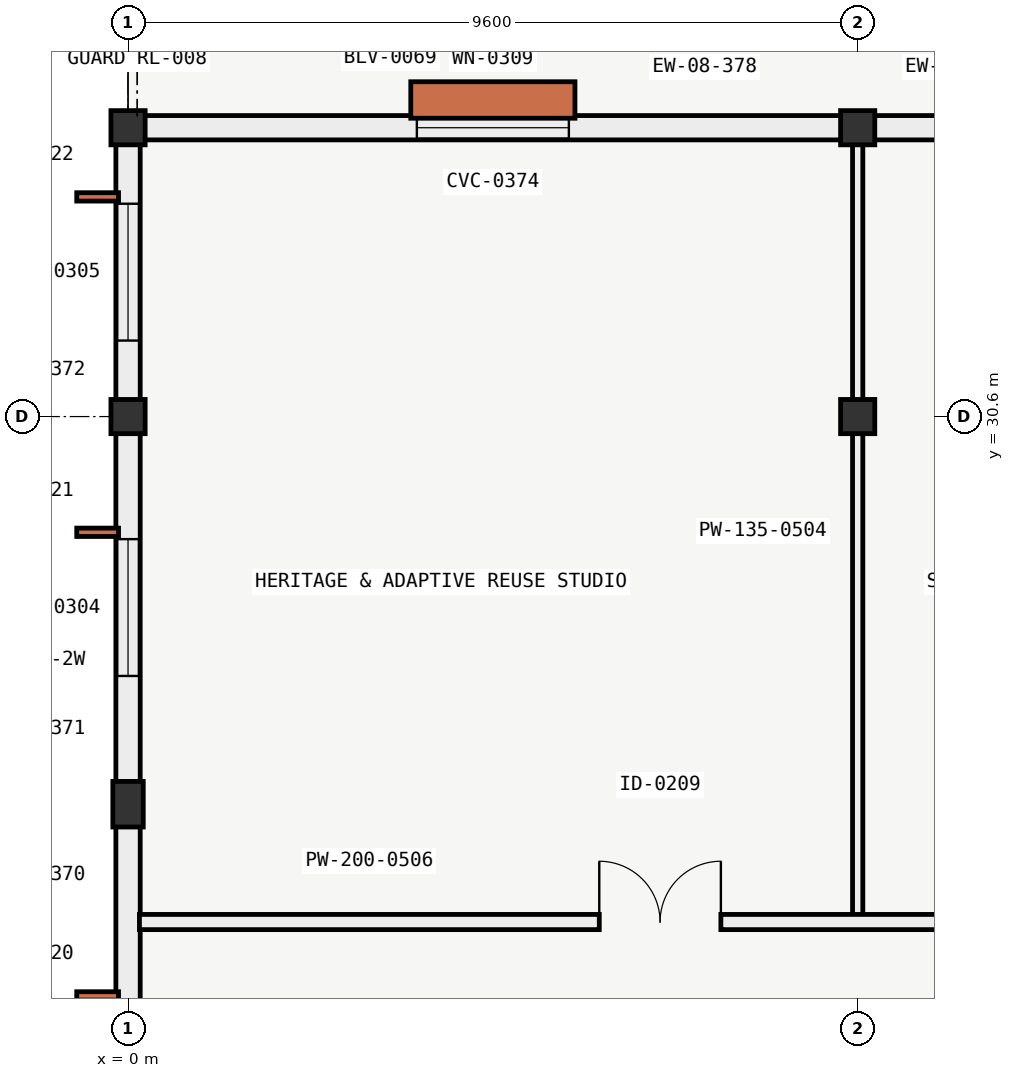
"""IFC4 building model, lengths in metres.
Left out: names, types, materials, properties, quantities, classifications, styles, units other than length and angle.
Written with IfcOpenShell. Run it as: python <this file> out.ifc"""

import sys

from ifc_helpers import new_model, si_unit, direction, frame, frame_2d, origin, origin_2d, place, context, subcontext, project, spatial, polyline, rectangle, outline, extrude, element, fill, save


model = new_model("IFC4")
c1 = context("Model", 3, precision=1e-05, world=origin(), true_north=direction((0.0, 1.0)))
c2 = subcontext(c1, "Body", "Model", "MODEL_VIEW")
j1 = project(units=[si_unit("LENGTHUNIT", "METRE"), si_unit("PLANEANGLEUNIT", "RADIAN")], contexts=[c1])
p1 = place(None, origin())
s1 = spatial("IfcSite", under=j1, at=p1, CompositionType="ELEMENT")
p2 = place(p1, origin())
s2 = spatial("IfcBuilding", under=s1, at=p2, CompositionType="ELEMENT")
p3 = place(p2, frame((0.0, 0.0, 30.6)))
s3 = spatial("IfcBuildingStorey", under=s2, at=p3, CompositionType="ELEMENT", Elevation=30.6)
for number, where, z_axis, x_axis in (
    (1, (0.0, 30.6, 0.0), (0.0, 0.0, 1.0), (1.0, 0.0, 0.0)),
    (2, (0.0, 34.4, 0.0), (0.0, 0.0, 1.0), (1.0, 0.0, 0.0)),
    (3, (9.6, 30.6, 0.0), (0.0, 0.0, 1.0), (1.0, 0.0, 0.0)),
    (4, (9.6, 34.4, 0.0), (0.0, 0.0, 1.0), (1.0, 0.0, 0.0)),
):
    element("IfcColumn", number, at=place(p3, frame(where, z_axis=z_axis, x_axis=x_axis)), inside=s3, PredefinedType="COLUMN", context=c2, shape_type="SweptSolid", body=[
        extrude(rectangle(XDim=0.45, YDim=0.45, at=origin_2d()), origin(), (0.0, 0.0, 1.0), 4.2),
    ])
p4 = place(p3, frame((0.0, 25.5, 0.0), z_axis=(0.0, 0.0, 1.0), x_axis=(1.0, 0.0, 0.0)))
e5 = element("IfcColumn", 5, at=p4, inside=s3, PredefinedType="PILASTER", context=c2, shape_type="SweptSolid", body=[
    extrude(rectangle(XDim=0.4, YDim=0.6, at=origin_2d()), origin(), (0.0, 0.0, 1.0), 4.2),
])
p5 = place(p3, frame((0.0, 20.626, 0.0), z_axis=(0.0, 0.0, 1.0), x_axis=(0.0, 1.0, 0.0)))
e6 = element("IfcWall", 6, at=p5, inside=s3, PredefinedType="SOLIDWALL", context=c2, shape_type="SweptSolid", body=[
    extrude(rectangle(XDim=3.324, YDim=0.28, at=frame_2d((1.662, 0.0))), origin(), (0.0, 0.0, 1.0), 3.3),
])
p6 = place(p5, frame((1.062, 0.0, 0.75)))
e7 = element("IfcOpeningElement", 7, at=p6, cuts=e6, PredefinedType="OPENING", context=c2, shape_type="SweptSolid", body=[
    extrude(rectangle(XDim=1.2, YDim=2.4, at=frame_2d((0.6, 1.2))), frame((0.0, 0.15, 0.0), z_axis=(0.0, -1.0, 0.0), x_axis=(1.0, 0.0, 0.0)), (0.0, 0.0, 1.0), 0.3),
])
p7 = place(p3, frame((0.0, 23.95, 0.0), z_axis=(0.0, 0.0, 1.0), x_axis=(0.0, 1.0, 0.0)))
e8 = element("IfcWall", 8, at=p7, inside=s3, PredefinedType="SOLIDWALL", context=c2, shape_type="SweptSolid", body=[
    extrude(rectangle(XDim=1.249, YDim=0.28, at=frame_2d((0.625, 0.0))), origin(), (0.0, 0.0, 1.0), 3.3),
])
p8 = place(p3, frame((0.0, 25.801, 0.0), z_axis=(0.0, 0.0, 1.0), x_axis=(0.0, 1.0, 0.0)))
e9 = element("IfcWall", 9, at=p8, inside=s3, PredefinedType="SOLIDWALL", context=c2, shape_type="SweptSolid", body=[
    extrude(rectangle(XDim=4.573, YDim=0.28, at=frame_2d((2.287, 0.0))), origin(), (0.0, 0.0, 1.0), 3.3),
])
p9 = place(p8, frame((1.386, 0.0, 0.85)))
e10 = element("IfcOpeningElement", 10, at=p9, cuts=e9, PredefinedType="OPENING", context=c2, shape_type="SweptSolid", body=[
    extrude(rectangle(XDim=1.8, YDim=2.1, at=frame_2d((0.9, 1.05))), frame((0.0, 0.15, 0.0), z_axis=(0.0, -1.0, 0.0), x_axis=(1.0, 0.0, 0.0)), (0.0, 0.0, 1.0), 0.3),
])
p10 = place(p3, frame((0.0, 30.826, 0.0), z_axis=(0.0, 0.0, 1.0), x_axis=(0.0, 1.0, 0.0)))
e11 = element("IfcWall", 11, at=p10, inside=s3, PredefinedType="SOLIDWALL", context=c2, shape_type="SweptSolid", body=[
    extrude(rectangle(XDim=3.348, YDim=0.28, at=frame_2d((1.674, 0.0))), origin(), (0.0, 0.0, 1.0), 3.3),
])
p11 = place(p10, frame((0.774, 0.0, 0.85)))
e12 = element("IfcOpeningElement", 12, at=p11, cuts=e11, PredefinedType="OPENING", context=c2, shape_type="SweptSolid", body=[
    extrude(rectangle(XDim=1.8, YDim=2.1, at=frame_2d((0.9, 1.05))), frame((0.0, 0.15, 0.0), z_axis=(0.0, -1.0, 0.0), x_axis=(1.0, 0.0, 0.0)), (0.0, 0.0, 1.0), 0.3),
])
p12 = place(p3, frame((0.226, 34.4, 0.0), z_axis=(0.0, 0.0, 1.0), x_axis=(1.0, 0.0, 0.0)))
e13 = element("IfcWall", 13, at=p12, inside=s3, PredefinedType="SOLIDWALL", context=c2, shape_type="SweptSolid", body=[
    extrude(rectangle(XDim=9.148, YDim=0.28, at=frame_2d((4.574, 0.0))), origin(), (0.0, 0.0, 1.0), 3.3),
])
p13 = place(p12, frame((3.574, 0.0, 0.85)))
e14 = element("IfcOpeningElement", 14, at=p13, cuts=e13, PredefinedType="OPENING", context=c2, shape_type="SweptSolid", body=[
    extrude(rectangle(XDim=2.0, YDim=1.35, at=frame_2d((1.0, 0.675))), frame((0.0, 0.15, 0.0), z_axis=(0.0, -1.0, 0.0), x_axis=(1.0, 0.0, 0.0)), (0.0, 0.0, 1.0), 0.3),
])
p14 = place(p3, frame((9.826, 34.4, 0.0), z_axis=(0.0, 0.0, 1.0), x_axis=(1.0, 0.0, 0.0)))
e15 = element("IfcWall", 15, at=p14, inside=s3, PredefinedType="SOLIDWALL", context=c2, shape_type="SweptSolid", body=[
    extrude(rectangle(XDim=6.349, YDim=0.28, at=frame_2d((3.175, 0.0))), origin(), (0.0, 0.0, 1.0), 3.3),
])
p15 = place(p14, frame((2.175, 0.0, 0.85)))
e16 = element("IfcOpeningElement", 16, at=p15, cuts=e15, PredefinedType="OPENING", context=c2, shape_type="SweptSolid", body=[
    extrude(rectangle(XDim=2.0, YDim=1.35, at=frame_2d((1.0, 0.675))), frame((0.0, 0.15, 0.0), z_axis=(0.0, -1.0, 0.0), x_axis=(1.0, 0.0, 0.0)), (0.0, 0.0, 1.0), 0.3),
])
p16 = place(p3, frame((0.0, 34.4, 4.2), z_axis=(0.0, 0.0, 1.0), x_axis=(1.0, 0.0, 0.0)))
e17 = element("IfcWall", 17, at=p16, inside=s3, PredefinedType="SOLIDWALL", context=c2, shape_type="SweptSolid", body=[
    extrude(rectangle(XDim=41.6, YDim=0.32, at=frame_2d((20.8, 0.0))), origin(), (0.0, 0.0, 1.0), 0.551),
])
p17 = place(p3, frame((0.0, 20.4, 4.2), z_axis=(0.0, 0.0, 1.0), x_axis=(0.0, 1.0, 0.0)))
e18 = element("IfcWall", 18, at=p17, inside=s3, PredefinedType="SOLIDWALL", context=c2, shape_type="SweptSolid", body=[
    extrude(outline(polyline([(0.0, 0.0), (14.0, 0.0), (14.0, 0.551), (0.0, 2.279), (0.0, 0.0)])), frame((0.0, 0.16, 0.0), z_axis=(0.0, -1.0, 0.0), x_axis=(1.0, 0.0, 0.0)), (0.0, 0.0, 1.0), 0.32),
])
p18 = place(p3, frame((9.6, 23.95, 0.0), z_axis=(0.0, 0.0, 1.0), x_axis=(0.0, 1.0, 0.0)))
e19 = element("IfcWall", 19, at=p18, inside=s3, PredefinedType="PARTITIONING", context=c2, shape_type="SweptSolid", body=[
    extrude(rectangle(XDim=10.3, YDim=0.135, at=frame_2d((5.15, 0.0))), origin(), (0.0, 0.0, 1.0), 3.85),
])
p19 = place(p3, frame((0.15, 23.95, 0.0), z_axis=(0.0, 0.0, 1.0), x_axis=(1.0, 0.0, 0.0)))
e20 = element("IfcWall", 20, at=p19, inside=s3, PredefinedType="PARTITIONING", context=c2, shape_type="SweptSolid", body=[
    extrude(rectangle(XDim=15.86, YDim=0.2, at=frame_2d((7.93, 0.0))), origin(), (0.0, 0.0, 1.0), 3.63),
])
p20 = place(p19, frame((6.05, 0.0, 0.0)))
e21 = element("IfcOpeningElement", 21, at=p20, cuts=e20, PredefinedType="OPENING", context=c2, shape_type="SweptSolid", body=[
    extrude(rectangle(XDim=1.6, YDim=2.25, at=frame_2d((0.8, 1.125))), frame((0.0, 0.11, 0.0), z_axis=(0.0, -1.0, 0.0), x_axis=(1.0, 0.0, 0.0)), (0.0, 0.0, 1.0), 0.22),
])
p21 = place(p19, frame((13.0, 0.0, 0.0)))
e22 = element("IfcOpeningElement", 22, at=p21, cuts=e20, PredefinedType="OPENING", context=c2, shape_type="SweptSolid", body=[
    extrude(rectangle(XDim=0.95, YDim=2.1, at=frame_2d((0.475, 1.05))), frame((0.0, 0.11, 0.0), z_axis=(0.0, -1.0, 0.0), x_axis=(1.0, 0.0, 0.0)), (0.0, 0.0, 1.0), 0.22),
])
p22 = place(p9, origin())
e23 = element("IfcWindow", 23, at=p22, inside=s3, PartitioningType="SINGLE_PANEL", PredefinedType="WINDOW", context=c2, shape_type="SweptSolid", body=[
    extrude(rectangle(XDim=1.8, YDim=2.1, at=frame_2d((0.9, 1.05))), frame((0.0, 0.03, 0.0), z_axis=(0.0, -1.0, 0.0), x_axis=(1.0, 0.0, 0.0)), (0.0, 0.0, 1.0), 0.06),
])
fill(e10, e23)
p23 = place(p11, origin())
e24 = element("IfcWindow", 24, at=p23, inside=s3, PartitioningType="SINGLE_PANEL", PredefinedType="WINDOW", context=c2, shape_type="SweptSolid", body=[
    extrude(rectangle(XDim=1.8, YDim=2.1, at=frame_2d((0.9, 1.05))), frame((0.0, 0.03, 0.0), z_axis=(0.0, -1.0, 0.0), x_axis=(1.0, 0.0, 0.0)), (0.0, 0.0, 1.0), 0.06),
])
fill(e12, e24)
p24 = place(p13, origin())
e25 = element("IfcWindow", 25, at=p24, inside=s3, PartitioningType="SINGLE_PANEL", PredefinedType="WINDOW", context=c2, shape_type="SweptSolid", body=[
    extrude(rectangle(XDim=2.0, YDim=1.35, at=frame_2d((1.0, 0.675))), frame((0.0, 0.03, 0.0), z_axis=(0.0, -1.0, 0.0), x_axis=(1.0, 0.0, 0.0)), (0.0, 0.0, 1.0), 0.06),
])
fill(e14, e25)
p25 = place(p20, origin())
e26 = element("IfcDoor", 26, at=p25, inside=s3, OperationType="DOUBLE_DOOR_SINGLE_SWING", PredefinedType="DOOR", context=c2, shape_type="SweptSolid", body=[
    extrude(rectangle(XDim=1.6, YDim=2.25, at=frame_2d((0.8, 1.125))), frame((0.0, 0.025, 0.0), z_axis=(0.0, -1.0, 0.0), x_axis=(1.0, 0.0, 0.0)), (0.0, 0.0, 1.0), 0.05),
])
fill(e21, e26)
save(model, sys.argv[1])
